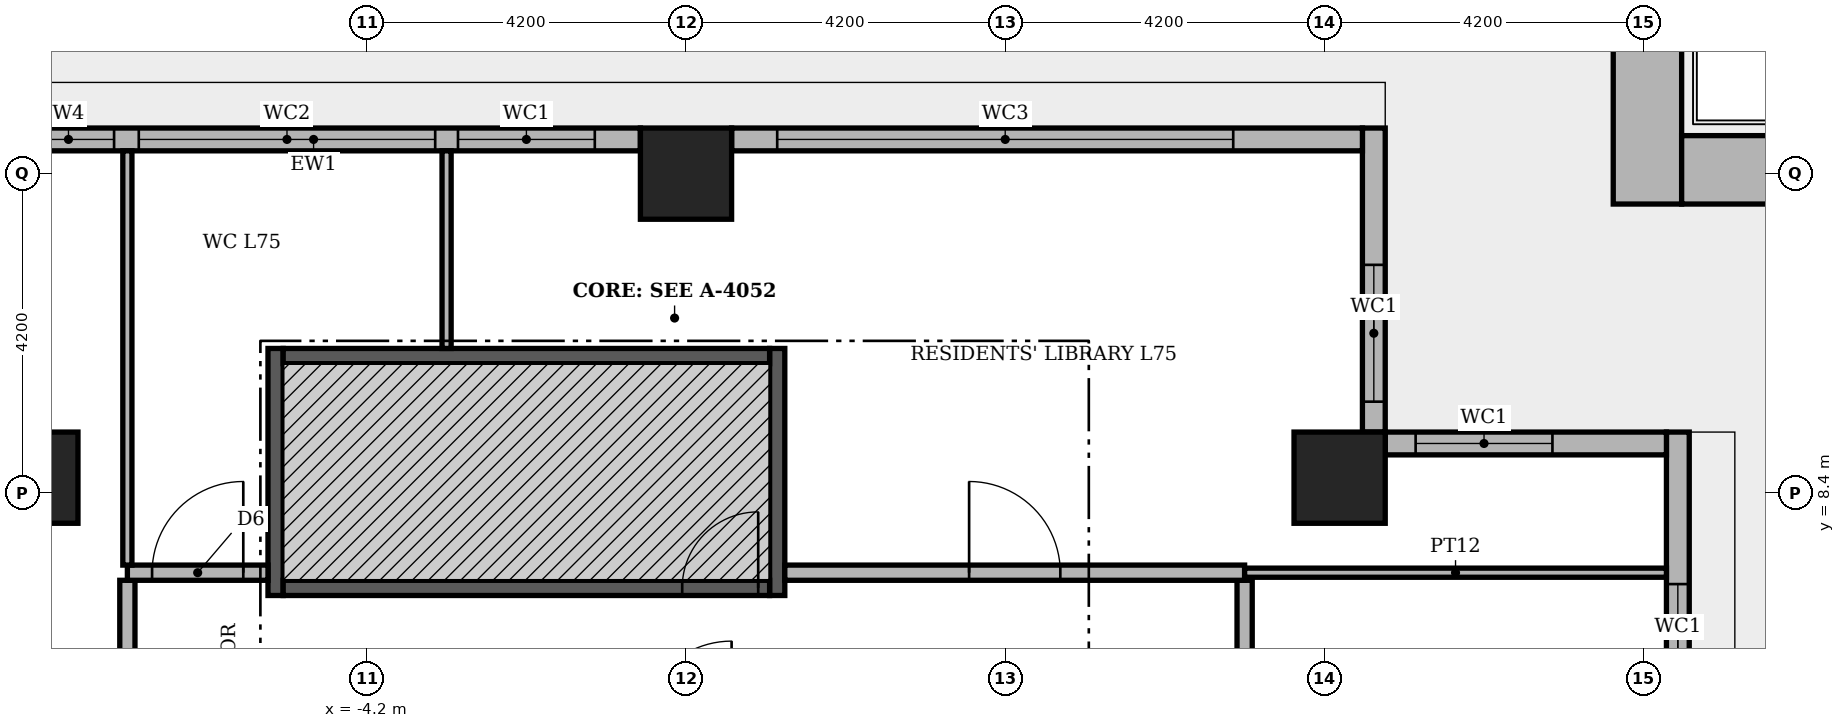
"""IFC4 building model, lengths in metres.
Left out: names, types, materials, properties, quantities, classifications, styles, units other than length and angle.
Written with IfcOpenShell. Run it as: python <this file> out.ifc"""

import sys

from ifc_helpers import new_model, si_unit, direction, frame, frame_2d, origin, origin_2d, place, context, subcontext, project, spatial, rectangle, extrude, element, fill, save


model = new_model("IFC4")
c1 = context("Model", 3, precision=1e-05, world=origin(), true_north=direction((0.0, 1.0)))
c2 = subcontext(c1, "Body", "Model", "MODEL_VIEW")
j1 = project(units=[si_unit("LENGTHUNIT", "METRE"), si_unit("PLANEANGLEUNIT", "RADIAN")], contexts=[c1])
p1 = place(None, origin())
s1 = spatial("IfcSite", under=j1, at=p1, CompositionType="ELEMENT")
p2 = place(p1, origin())
s2 = spatial("IfcBuilding", under=s1, at=p2, CompositionType="ELEMENT")
p3 = place(p2, frame((0.0, 0.0, 312.3)))
s3 = spatial("IfcBuildingStorey", under=s2, at=p3, CompositionType="ELEMENT", Elevation=312.3)
for number, where, z_axis, x_axis in (
    (1, (-5.4, 7.05, 0.0), (0.0, 0.0, 1.0), (0.0, 1.0, 0.0)),
    (2, (1.2, 7.05, 0.0), (0.0, 0.0, 1.0), (0.0, 1.0, 0.0)),
):
    element("IfcWall", number, at=place(p3, frame(where, z_axis=z_axis, x_axis=x_axis)), inside=s3, PredefinedType="SHEAR", context=c2, shape_type="SweptSolid", body=[
        extrude(rectangle(XDim=3.25, YDim=0.2, at=frame_2d((1.625, 0.0))), origin(), (0.0, 0.0, 1.0), 3.55),
    ])
p4 = place(p3, frame((-5.3, 7.15, 0.0), z_axis=(0.0, 0.0, 1.0), x_axis=(1.0, 0.0, 0.0)))
e3 = element("IfcWall", 3, at=p4, inside=s3, PredefinedType="SHEAR", context=c2, shape_type="SweptSolid", body=[
    extrude(rectangle(XDim=6.4, YDim=0.2, at=frame_2d((3.2, 0.0))), origin(), (0.0, 0.0, 1.0), 3.55),
])
p5 = place(p4, frame((5.25, 0.0, 0.0)))
e4 = element("IfcOpeningElement", 4, at=p5, cuts=e3, PredefinedType="OPENING", context=c2, shape_type="SweptSolid", body=[
    extrude(rectangle(XDim=1.0, YDim=2.1, at=frame_2d((0.5, 1.05))), frame((0.0, 0.11, 0.0), z_axis=(0.0, -1.0, 0.0), x_axis=(1.0, 0.0, 0.0)), (0.0, 0.0, 1.0), 0.22),
])
p6 = place(p3, frame((-5.3, 10.2, 0.0), z_axis=(0.0, 0.0, 1.0), x_axis=(1.0, 0.0, 0.0)))
e5 = element("IfcWall", 5, at=p6, inside=s3, PredefinedType="SHEAR", context=c2, shape_type="SweptSolid", body=[
    extrude(rectangle(XDim=6.4, YDim=0.2, at=frame_2d((3.2, 0.0))), origin(), (0.0, 0.0, 1.0), 3.55),
])
for number, where, z_axis, x_axis in (
    (6, (8.6, 8.6, -0.35), (0.0, 0.0, 1.0), (1.0, 0.0, 0.0)),
    (7, (0.0, 12.6, -0.35), (0.0, 0.0, 1.0), (1.0, 0.0, 0.0)),
    (8, (-8.6, 8.6, -0.35), (0.0, 0.0, 1.0), (1.0, 0.0, 0.0)),
):
    element("IfcColumn", number, at=place(p3, frame(where, z_axis=z_axis, x_axis=x_axis)), inside=s3, PredefinedType="COLUMN", context=c2, shape_type="SweptSolid", body=[
        extrude(rectangle(XDim=1.2, YDim=1.2, at=origin_2d()), origin(), (0.0, 0.0, 1.0), 4.25),
    ])
p7 = place(p3, frame((13.05, 0.6, 0.0), z_axis=(0.0, 0.0, 1.0), x_axis=(0.0, 1.0, 0.0)))
e9 = element("IfcWall", 9, at=p7, inside=s3, PredefinedType="STANDARD", context=c2, shape_type="SweptSolid", body=[
    extrude(rectangle(XDim=8.6, YDim=0.3, at=frame_2d((4.3, 0.0))), origin(), (0.0, 0.0, 1.0), 3.55),
])
p8 = place(p7, frame((0.6, 0.0, 0.6)))
e10 = element("IfcOpeningElement", 10, at=p8, cuts=e9, PredefinedType="OPENING", context=c2, shape_type="SweptSolid", body=[
    extrude(rectangle(XDim=1.8, YDim=2.4, at=frame_2d((0.9, 1.2))), frame((0.0, 0.16, 0.0), z_axis=(0.0, -1.0, 0.0), x_axis=(1.0, 0.0, 0.0)), (0.0, 0.0, 1.0), 0.32),
])
p9 = place(p7, frame((2.7, 0.0, 0.0)))
e11 = element("IfcOpeningElement", 11, at=p9, cuts=e9, PredefinedType="OPENING", context=c2, shape_type="SweptSolid", body=[
    extrude(rectangle(XDim=1.8, YDim=2.4, at=frame_2d((0.9, 1.2))), frame((0.0, 0.16, 0.0), z_axis=(0.0, -1.0, 0.0), x_axis=(1.0, 0.0, 0.0)), (0.0, 0.0, 1.0), 0.32),
])
p10 = place(p7, frame((4.8, 0.0, 0.6)))
e12 = element("IfcOpeningElement", 12, at=p10, cuts=e9, PredefinedType="OPENING", context=c2, shape_type="SweptSolid", body=[
    extrude(rectangle(XDim=1.8, YDim=2.4, at=frame_2d((0.9, 1.2))), frame((0.0, 0.16, 0.0), z_axis=(0.0, -1.0, 0.0), x_axis=(1.0, 0.0, 0.0)), (0.0, 0.0, 1.0), 0.32),
])
p11 = place(p3, frame((12.9, 9.05, 0.0), z_axis=(0.0, 0.0, 1.0), x_axis=(-1.0, 0.0, 0.0)))
e13 = element("IfcWall", 13, at=p11, inside=s3, PredefinedType="STANDARD", context=c2, shape_type="SweptSolid", body=[
    extrude(rectangle(XDim=3.7, YDim=0.3, at=frame_2d((1.85, 0.0))), origin(), (0.0, 0.0, 1.0), 3.55),
])
p12 = place(p11, frame((1.5, 0.0, 0.6)))
e14 = element("IfcOpeningElement", 14, at=p12, cuts=e13, PredefinedType="OPENING", context=c2, shape_type="SweptSolid", body=[
    extrude(rectangle(XDim=1.8, YDim=2.4, at=frame_2d((0.9, 1.2))), frame((0.0, 0.16, 0.0), z_axis=(0.0, -1.0, 0.0), x_axis=(1.0, 0.0, 0.0)), (0.0, 0.0, 1.0), 0.32),
])
p13 = place(p3, frame((9.05, 9.2, 0.0), z_axis=(0.0, 0.0, 1.0), x_axis=(0.0, 1.0, 0.0)))
e15 = element("IfcWall", 15, at=p13, inside=s3, PredefinedType="STANDARD", context=c2, shape_type="SweptSolid", body=[
    extrude(rectangle(XDim=4.0, YDim=0.3, at=frame_2d((2.0, 0.0))), origin(), (0.0, 0.0, 1.0), 3.55),
])
p14 = place(p13, frame((0.4, 0.0, 0.6)))
e16 = element("IfcOpeningElement", 16, at=p14, cuts=e15, PredefinedType="OPENING", context=c2, shape_type="SweptSolid", body=[
    extrude(rectangle(XDim=1.8, YDim=2.4, at=frame_2d((0.9, 1.2))), frame((0.0, 0.16, 0.0), z_axis=(0.0, -1.0, 0.0), x_axis=(1.0, 0.0, 0.0)), (0.0, 0.0, 1.0), 0.32),
])
p15 = place(p3, frame((8.9, 13.05, 0.0), z_axis=(0.0, 0.0, 1.0), x_axis=(-1.0, 0.0, 0.0)))
e17 = element("IfcWall", 17, at=p15, inside=s3, PredefinedType="STANDARD", context=c2, shape_type="SweptSolid", body=[
    extrude(rectangle(XDim=8.3, YDim=0.3, at=frame_2d((4.15, 0.0))), origin(), (0.0, 0.0, 1.0), 3.55),
])
p16 = place(p15, frame((1.7, 0.0, 0.6)))
e18 = element("IfcOpeningElement", 18, at=p16, cuts=e17, PredefinedType="OPENING", context=c2, shape_type="SweptSolid", body=[
    extrude(rectangle(XDim=6.0, YDim=2.4, at=frame_2d((3.0, 1.2))), frame((0.0, 0.16, 0.0), z_axis=(0.0, -1.0, 0.0), x_axis=(1.0, 0.0, 0.0)), (0.0, 0.0, 1.0), 0.32),
])
p17 = place(p3, frame((-0.6, 13.05, 0.0), z_axis=(0.0, 0.0, 1.0), x_axis=(-1.0, 0.0, 0.0)))
e19 = element("IfcWall", 19, at=p17, inside=s3, PredefinedType="STANDARD", context=c2, shape_type="SweptSolid", body=[
    extrude(rectangle(XDim=8.6, YDim=0.3, at=frame_2d((4.3, 0.0))), origin(), (0.0, 0.0, 1.0), 3.55),
])
p18 = place(p17, frame((0.6, 0.0, 0.6)))
e20 = element("IfcOpeningElement", 20, at=p18, cuts=e19, PredefinedType="OPENING", context=c2, shape_type="SweptSolid", body=[
    extrude(rectangle(XDim=1.8, YDim=2.4, at=frame_2d((0.9, 1.2))), frame((0.0, 0.16, 0.0), z_axis=(0.0, -1.0, 0.0), x_axis=(1.0, 0.0, 0.0)), (0.0, 0.0, 1.0), 0.32),
])
p19 = place(p17, frame((2.7, 0.0, 0.6)))
e21 = element("IfcOpeningElement", 21, at=p19, cuts=e19, PredefinedType="OPENING", context=c2, shape_type="SweptSolid", body=[
    extrude(rectangle(XDim=3.9, YDim=2.4, at=frame_2d((1.95, 1.2))), frame((0.0, 0.16, 0.0), z_axis=(0.0, -1.0, 0.0), x_axis=(1.0, 0.0, 0.0)), (0.0, 0.0, 1.0), 0.32),
])
p20 = place(p17, frame((6.925, 0.0, 0.9)))
e22 = element("IfcOpeningElement", 22, at=p20, cuts=e19, PredefinedType="OPENING", context=c2, shape_type="SweptSolid", body=[
    extrude(rectangle(XDim=1.2, YDim=2.1, at=frame_2d((0.6, 1.05))), frame((0.0, 0.16, 0.0), z_axis=(0.0, -1.0, 0.0), x_axis=(1.0, 0.0, 0.0)), (0.0, 0.0, 1.0), 0.32),
])
p21 = place(p3, frame((12.65, 12.2, 0.0), z_axis=(0.0, 0.0, 1.0), x_axis=(0.0, 1.0, 0.0)))
e23 = element("IfcWall", 23, at=p21, inside=s3, PredefinedType="MOVABLE", context=c2, shape_type="SweptSolid", body=[
    extrude(rectangle(XDim=6.4, YDim=0.9, at=frame_2d((3.2, 0.0))), origin(), (0.0, 0.0, 1.0), 0.6),
])
p22 = place(p3, frame((13.1, 12.65, 0.0), z_axis=(0.0, 0.0, 1.0), x_axis=(1.0, 0.0, 0.0)))
e24 = element("IfcWall", 24, at=p22, inside=s3, PredefinedType="MOVABLE", context=c2, shape_type="SweptSolid", body=[
    extrude(rectangle(XDim=4.6, YDim=0.9, at=frame_2d((2.3, 0.0))), origin(), (0.0, 0.0, 1.0), 0.6),
])
p23 = place(p3, frame((-7.35, -7.25, 0.0), z_axis=(0.0, 0.0, 1.0), x_axis=(0.0, 1.0, 0.0)))
e25 = element("IfcWall", 25, at=p23, inside=s3, PredefinedType="PARTITIONING", context=c2, shape_type="SweptSolid", body=[
    extrude(rectangle(XDim=14.5, YDim=0.2, at=frame_2d((7.25, 0.0))), origin(), (0.0, 0.0, 1.0), 3.55),
])
p24 = place(p23, frame((8.75, 0.0, 0.0)))
e26 = element("IfcOpeningElement", 26, at=p24, cuts=e25, PredefinedType="OPENING", context=c2, shape_type="SweptSolid", body=[
    extrude(rectangle(XDim=1.2, YDim=2.1, at=frame_2d((0.6, 1.05))), frame((0.0, 0.11, 0.0), z_axis=(0.0, -1.0, 0.0), x_axis=(1.0, 0.0, 0.0)), (0.0, 0.0, 1.0), 0.22),
])
p25 = place(p23, frame((1.4, 0.0, 0.0)))
e27 = element("IfcOpeningElement", 27, at=p25, cuts=e25, PredefinedType="OPENING", context=c2, shape_type="SweptSolid", body=[
    extrude(rectangle(XDim=1.2, YDim=2.1, at=frame_2d((0.6, 1.05))), frame((0.0, 0.11, 0.0), z_axis=(0.0, -1.0, 0.0), x_axis=(1.0, 0.0, 0.0)), (0.0, 0.0, 1.0), 0.22),
])
p26 = place(p3, frame((7.35, -7.25, 0.0), z_axis=(0.0, 0.0, 1.0), x_axis=(0.0, 1.0, 0.0)))
e28 = element("IfcWall", 28, at=p26, inside=s3, PredefinedType="PARTITIONING", context=c2, shape_type="SweptSolid", body=[
    extrude(rectangle(XDim=14.5, YDim=0.2, at=frame_2d((7.25, 0.0))), origin(), (0.0, 0.0, 1.0), 3.55),
])
p27 = place(p26, frame((1.4, 0.0, 0.0)))
e29 = element("IfcOpeningElement", 29, at=p27, cuts=e28, PredefinedType="OPENING", context=c2, shape_type="SweptSolid", body=[
    extrude(rectangle(XDim=1.2, YDim=2.1, at=frame_2d((0.6, 1.05))), frame((0.0, 0.11, 0.0), z_axis=(0.0, -1.0, 0.0), x_axis=(1.0, 0.0, 0.0)), (0.0, 0.0, 1.0), 0.22),
])
p28 = place(p26, frame((8.75, 0.0, 0.0)))
e30 = element("IfcOpeningElement", 30, at=p28, cuts=e28, PredefinedType="OPENING", context=c2, shape_type="SweptSolid", body=[
    extrude(rectangle(XDim=1.2, YDim=2.1, at=frame_2d((0.6, 1.05))), frame((0.0, 0.11, 0.0), z_axis=(0.0, -1.0, 0.0), x_axis=(1.0, 0.0, 0.0)), (0.0, 0.0, 1.0), 0.22),
])
p29 = place(p3, frame((-7.35, 7.35, 0.0), z_axis=(0.0, 0.0, 1.0), x_axis=(1.0, 0.0, 0.0)))
e31 = element("IfcWall", 31, at=p29, inside=s3, PredefinedType="PARTITIONING", context=c2, shape_type="SweptSolid", body=[
    extrude(rectangle(XDim=1.85, YDim=0.2, at=frame_2d((0.925, 0.0))), origin(), (0.0, 0.0, 1.0), 3.55),
])
p30 = place(p29, frame((0.325, 0.0, 0.0)))
e32 = element("IfcOpeningElement", 32, at=p30, cuts=e31, PredefinedType="OPENING", context=c2, shape_type="SweptSolid", body=[
    extrude(rectangle(XDim=1.2, YDim=2.1, at=frame_2d((0.6, 1.05))), frame((0.0, 0.11, 0.0), z_axis=(0.0, -1.0, 0.0), x_axis=(1.0, 0.0, 0.0)), (0.0, 0.0, 1.0), 0.22),
])
p31 = place(p3, frame((1.3, 7.35, 0.0), z_axis=(0.0, 0.0, 1.0), x_axis=(1.0, 0.0, 0.0)))
e33 = element("IfcWall", 33, at=p31, inside=s3, PredefinedType="PARTITIONING", context=c2, shape_type="SweptSolid", body=[
    extrude(rectangle(XDim=6.05, YDim=0.2, at=frame_2d((3.025, 0.0))), origin(), (0.0, 0.0, 1.0), 3.55),
])
p32 = place(p31, frame((2.425, 0.0, 0.0)))
e34 = element("IfcOpeningElement", 34, at=p32, cuts=e33, PredefinedType="OPENING", context=c2, shape_type="SweptSolid", body=[
    extrude(rectangle(XDim=1.2, YDim=2.1, at=frame_2d((0.6, 1.05))), frame((0.0, 0.11, 0.0), z_axis=(0.0, -1.0, 0.0), x_axis=(1.0, 0.0, 0.0)), (0.0, 0.0, 1.0), 0.22),
])
p33 = place(p3, frame((7.35, 7.35, 0.0), z_axis=(0.0, 0.0, 1.0), x_axis=(1.0, 0.0, 0.0)))
e35 = element("IfcWall", 35, at=p33, inside=s3, PredefinedType="PARTITIONING", context=c2, shape_type="SweptSolid", body=[
    extrude(rectangle(XDim=5.55, YDim=0.12, at=frame_2d((2.775, 0.0))), origin(), (0.0, 0.0, 1.0), 3.55),
])
p34 = place(p3, frame((-7.35, 7.45, 0.0), z_axis=(0.0, 0.0, 1.0), x_axis=(0.0, 1.0, 0.0)))
e36 = element("IfcWall", 36, at=p34, inside=s3, PredefinedType="PARTITIONING", context=c2, shape_type="SweptSolid", body=[
    extrude(rectangle(XDim=5.45, YDim=0.12, at=frame_2d((2.725, 0.0))), origin(), (0.0, 0.0, 1.0), 3.55),
])
p35 = place(p3, frame((-3.15, 10.3, 0.0), z_axis=(0.0, 0.0, 1.0), x_axis=(0.0, 1.0, 0.0)))
e37 = element("IfcWall", 37, at=p35, inside=s3, PredefinedType="PARTITIONING", context=c2, shape_type="SweptSolid", body=[
    extrude(rectangle(XDim=2.6, YDim=0.12, at=frame_2d((1.3, 0.0))), origin(), (0.0, 0.0, 1.0), 3.55),
])
p36 = place(p10, origin())
e38 = element("IfcWindow", 38, at=p36, inside=s3, PartitioningType="SINGLE_PANEL", PredefinedType="WINDOW", context=c2, shape_type="SweptSolid", body=[
    extrude(rectangle(XDim=1.8, YDim=2.4, at=frame_2d((0.9, 1.2))), frame((0.0, 0.03, 0.0), z_axis=(0.0, -1.0, 0.0), x_axis=(1.0, 0.0, 0.0)), (0.0, 0.0, 1.0), 0.06),
])
fill(e12, e38)
p37 = place(p12, origin())
e39 = element("IfcWindow", 39, at=p37, inside=s3, PartitioningType="SINGLE_PANEL", PredefinedType="WINDOW", context=c2, shape_type="SweptSolid", body=[
    extrude(rectangle(XDim=1.8, YDim=2.4, at=frame_2d((0.9, 1.2))), frame((0.0, 0.03, 0.0), z_axis=(0.0, -1.0, 0.0), x_axis=(1.0, 0.0, 0.0)), (0.0, 0.0, 1.0), 0.06),
])
fill(e14, e39)
p38 = place(p14, origin())
e40 = element("IfcWindow", 40, at=p38, inside=s3, PartitioningType="SINGLE_PANEL", PredefinedType="WINDOW", context=c2, shape_type="SweptSolid", body=[
    extrude(rectangle(XDim=1.8, YDim=2.4, at=frame_2d((0.9, 1.2))), frame((0.0, 0.03, 0.0), z_axis=(0.0, -1.0, 0.0), x_axis=(1.0, 0.0, 0.0)), (0.0, 0.0, 1.0), 0.06),
])
fill(e16, e40)
p39 = place(p16, origin())
e41 = element("IfcWindow", 41, at=p39, inside=s3, PartitioningType="SINGLE_PANEL", PredefinedType="WINDOW", context=c2, shape_type="SweptSolid", body=[
    extrude(rectangle(XDim=6.0, YDim=2.4, at=frame_2d((3.0, 1.2))), frame((0.0, 0.03, 0.0), z_axis=(0.0, -1.0, 0.0), x_axis=(1.0, 0.0, 0.0)), (0.0, 0.0, 1.0), 0.06),
])
fill(e18, e41)
p40 = place(p18, origin())
e42 = element("IfcWindow", 42, at=p40, inside=s3, PartitioningType="SINGLE_PANEL", PredefinedType="WINDOW", context=c2, shape_type="SweptSolid", body=[
    extrude(rectangle(XDim=1.8, YDim=2.4, at=frame_2d((0.9, 1.2))), frame((0.0, 0.03, 0.0), z_axis=(0.0, -1.0, 0.0), x_axis=(1.0, 0.0, 0.0)), (0.0, 0.0, 1.0), 0.06),
])
fill(e20, e42)
p41 = place(p19, origin())
e43 = element("IfcWindow", 43, at=p41, inside=s3, PartitioningType="SINGLE_PANEL", PredefinedType="WINDOW", context=c2, shape_type="SweptSolid", body=[
    extrude(rectangle(XDim=3.9, YDim=2.4, at=frame_2d((1.95, 1.2))), frame((0.0, 0.03, 0.0), z_axis=(0.0, -1.0, 0.0), x_axis=(1.0, 0.0, 0.0)), (0.0, 0.0, 1.0), 0.06),
])
fill(e21, e43)
p42 = place(p20, origin())
e44 = element("IfcWindow", 44, at=p42, inside=s3, PartitioningType="SINGLE_PANEL", PredefinedType="WINDOW", context=c2, shape_type="SweptSolid", body=[
    extrude(rectangle(XDim=1.2, YDim=2.1, at=frame_2d((0.6, 1.05))), frame((0.0, 0.03, 0.0), z_axis=(0.0, -1.0, 0.0), x_axis=(1.0, 0.0, 0.0)), (0.0, 0.0, 1.0), 0.06),
])
fill(e22, e44)
p43 = place(p5, origin())
e45 = element("IfcDoor", 45, at=p43, inside=s3, OperationType="SINGLE_SWING_RIGHT", PredefinedType="DOOR", context=c2, shape_type="SweptSolid", body=[
    extrude(rectangle(XDim=1.0, YDim=2.1, at=frame_2d((0.5, 1.05))), frame((0.0, 0.025, 0.0), z_axis=(0.0, -1.0, 0.0), x_axis=(1.0, 0.0, 0.0)), (0.0, 0.0, 1.0), 0.05),
])
fill(e4, e45)
p44 = place(p32, origin())
e46 = element("IfcDoor", 46, at=p44, inside=s3, OperationType="SINGLE_SWING_LEFT", PredefinedType="DOOR", context=c2, shape_type="SweptSolid", body=[
    extrude(rectangle(XDim=1.2, YDim=2.1, at=frame_2d((0.6, 1.05))), frame((0.0, 0.025, 0.0), z_axis=(0.0, -1.0, 0.0), x_axis=(1.0, 0.0, 0.0)), (0.0, 0.0, 1.0), 0.05),
])
fill(e34, e46)
p45 = place(p30, origin())
e47 = element("IfcDoor", 47, at=p45, inside=s3, OperationType="SINGLE_SWING_RIGHT", PredefinedType="DOOR", context=c2, shape_type="SweptSolid", body=[
    extrude(rectangle(XDim=1.2, YDim=2.1, at=frame_2d((0.6, 1.05))), frame((0.0, 0.025, 0.0), z_axis=(0.0, -1.0, 0.0), x_axis=(1.0, 0.0, 0.0)), (0.0, 0.0, 1.0), 0.05),
])
fill(e32, e47)
save(model, sys.argv[1])
